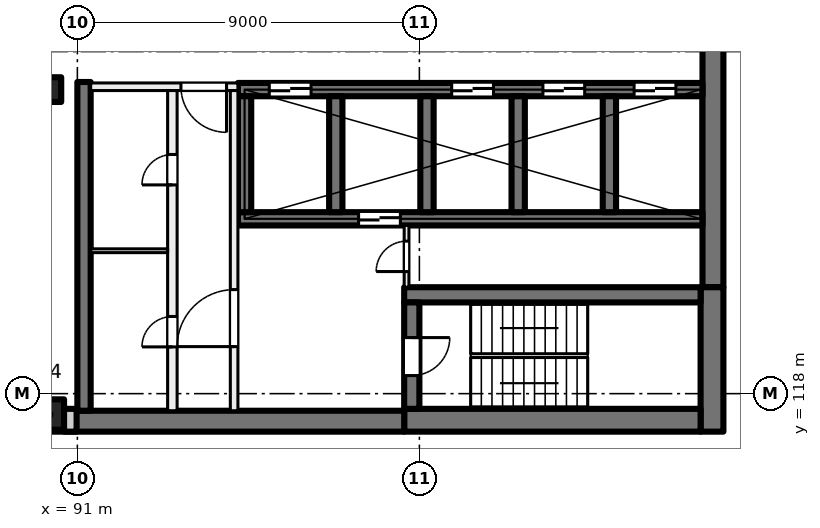
"""IFC4 building model, lengths in metres.
Left out: names, types, materials, properties, quantities, classifications, styles, units other than length and angle.
Written with IfcOpenShell. Run it as: python <this file> out.ifc"""

import sys

from ifc_helpers import new_model, si_unit, direction, frame, frame_2d, origin, origin_2d, place, context, subcontext, project, spatial, rectangle, extrude, element, fill, save


model = new_model("IFC4")
c1 = context("Model", 3, precision=1e-05, world=origin(), true_north=direction((0.0, 1.0)))
c2 = subcontext(c1, "Body", "Model", "MODEL_VIEW")
j1 = project(units=[si_unit("LENGTHUNIT", "METRE"), si_unit("PLANEANGLEUNIT", "RADIAN")], contexts=[c1])
p1 = place(None, origin())
s1 = spatial("IfcSite", under=j1, at=p1, CompositionType="ELEMENT")
p2 = place(p1, origin())
s2 = spatial("IfcBuilding", under=s1, at=p2, CompositionType="ELEMENT")
p3 = place(p2, frame((0.0, 0.0, 142.5)))
s3 = spatial("IfcBuildingStorey", under=s2, at=p3, CompositionType="ELEMENT", Elevation=142.5)
p4 = place(p3, frame((90.25, 126.0, 0.0), z_axis=(0.0, 0.0, 1.0), x_axis=(1.0, 0.0, 0.0)))
e1 = element("IfcColumn", 1, at=p4, inside=s3, PredefinedType="COLUMN", context=c2, shape_type="SweptSolid", body=[
    extrude(rectangle(XDim=0.65, YDim=0.65, at=origin_2d()), origin(), (0.0, 0.0, 1.0), 4.0),
])
p5 = place(p3, frame((90.25, 117.45, 0.0), z_axis=(0.0, 0.0, 1.0), x_axis=(1.0, 0.0, 0.0)))
e2 = element("IfcColumn", 2, at=p5, inside=s3, PredefinedType="COLUMN", context=c2, shape_type="SweptSolid", body=[
    extrude(rectangle(XDim=0.8, YDim=0.8, at=origin_2d()), origin(), (0.0, 0.0, 1.0), 4.0),
])
p6 = place(p3, frame((107.725, 135.2, 0.0), z_axis=(0.0, 0.0, 1.0), x_axis=(0.0, -1.0, 0.0)))
e3 = element("IfcWall", 3, at=p6, inside=s3, PredefinedType="SHEAR", context=c2, shape_type="SweptSolid", body=[
    extrude(rectangle(XDim=14.4, YDim=0.55, at=frame_2d((7.2, 0.0))), origin(), (0.0, 0.0, 1.0), 4.0),
])
p7 = place(p3, frame((107.7, 120.8, 0.0), z_axis=(0.0, 0.0, 1.0), x_axis=(0.0, -1.0, 0.0)))
e4 = element("IfcWall", 4, at=p7, inside=s3, PredefinedType="SHEAR", context=c2, shape_type="SweptSolid", body=[
    extrude(rectangle(XDim=3.8, YDim=0.6, at=frame_2d((1.9, 0.0))), origin(), (0.0, 0.0, 1.0), 4.0),
])
p8 = place(p3, frame((107.4, 117.3, 0.0), z_axis=(0.0, 0.0, 1.0), x_axis=(-1.0, 0.0, 0.0)))
e5 = element("IfcWall", 5, at=p8, inside=s3, PredefinedType="SHEAR", context=c2, shape_type="SweptSolid", body=[
    extrude(rectangle(XDim=7.8, YDim=0.6, at=frame_2d((3.9, 0.0))), origin(), (0.0, 0.0, 1.0), 4.0),
])
p9 = place(p3, frame((99.6, 117.275, 0.0), z_axis=(0.0, 0.0, 1.0), x_axis=(-1.0, 0.0, 0.0)))
e6 = element("IfcWall", 6, at=p9, inside=s3, PredefinedType="SHEAR", context=c2, shape_type="SweptSolid", body=[
    extrude(rectangle(XDim=8.95, YDim=0.55, at=frame_2d((4.475, 0.0))), origin(), (0.0, 0.0, 1.0), 4.0),
])
p10 = place(p3, frame((107.4, 120.6, 0.0), z_axis=(0.0, 0.0, 1.0), x_axis=(-1.0, 0.0, 0.0)))
e7 = element("IfcWall", 7, at=p10, inside=s3, PredefinedType="SHEAR", context=c2, shape_type="SweptSolid", body=[
    extrude(rectangle(XDim=7.8, YDim=0.4, at=frame_2d((3.9, 0.0))), origin(), (0.0, 0.0, 1.0), 4.0),
])
p11 = place(p3, frame((99.8, 120.4, 0.0), z_axis=(0.0, 0.0, 1.0), x_axis=(0.0, -1.0, 0.0)))
e8 = element("IfcWall", 8, at=p11, inside=s3, PredefinedType="SHEAR", context=c2, shape_type="SweptSolid", body=[
    extrude(rectangle(XDim=2.8, YDim=0.4, at=frame_2d((1.4, 0.0))), origin(), (0.0, 0.0, 1.0), 4.0),
])
p12 = place(p11, frame((0.925, 0.0, 0.0)))
e9 = element("IfcOpeningElement", 9, at=p12, cuts=e8, PredefinedType="OPENING", context=c2, shape_type="SweptSolid", body=[
    extrude(rectangle(XDim=1.0, YDim=2.1, at=frame_2d((0.5, 1.05))), frame((0.0, 0.21, 0.0), z_axis=(0.0, -1.0, 0.0), x_axis=(1.0, 0.0, 0.0)), (0.0, 0.0, 1.0), 0.42),
])
p13 = place(p3, frame((107.45, 126.0, 0.0), z_axis=(0.0, 0.0, 1.0), x_axis=(-1.0, 0.0, 0.0)))
e10 = element("IfcWall", 10, at=p13, inside=s3, PredefinedType="SHEAR", context=c2, shape_type="SweptSolid", body=[
    extrude(rectangle(XDim=12.225, YDim=0.35, at=frame_2d((6.112, 0.0))), origin(), (0.0, 0.0, 1.0), 4.0),
])
p14 = place(p13, frame((0.7, 0.0, 0.0)))
e11 = element("IfcOpeningElement", 11, at=p14, cuts=e10, PredefinedType="OPENING", context=c2, shape_type="SweptSolid", body=[
    extrude(rectangle(XDim=1.1, YDim=2.1, at=frame_2d((0.55, 1.05))), frame((0.0, 0.185, 0.0), z_axis=(0.0, -1.0, 0.0), x_axis=(1.0, 0.0, 0.0)), (0.0, 0.0, 1.0), 0.37),
])
p15 = place(p13, frame((3.1, 0.0, 0.0)))
e12 = element("IfcOpeningElement", 12, at=p15, cuts=e10, PredefinedType="OPENING", context=c2, shape_type="SweptSolid", body=[
    extrude(rectangle(XDim=1.1, YDim=2.1, at=frame_2d((0.55, 1.05))), frame((0.0, 0.185, 0.0), z_axis=(0.0, -1.0, 0.0), x_axis=(1.0, 0.0, 0.0)), (0.0, 0.0, 1.0), 0.37),
])
p16 = place(p13, frame((5.5, 0.0, 0.0)))
e13 = element("IfcOpeningElement", 13, at=p16, cuts=e10, PredefinedType="OPENING", context=c2, shape_type="SweptSolid", body=[
    extrude(rectangle(XDim=1.1, YDim=2.1, at=frame_2d((0.55, 1.05))), frame((0.0, 0.185, 0.0), z_axis=(0.0, -1.0, 0.0), x_axis=(1.0, 0.0, 0.0)), (0.0, 0.0, 1.0), 0.37),
])
p17 = place(p13, frame((10.3, 0.0, 0.0)))
e14 = element("IfcOpeningElement", 14, at=p17, cuts=e10, PredefinedType="OPENING", context=c2, shape_type="SweptSolid", body=[
    extrude(rectangle(XDim=1.1, YDim=2.1, at=frame_2d((0.55, 1.05))), frame((0.0, 0.185, 0.0), z_axis=(0.0, -1.0, 0.0), x_axis=(1.0, 0.0, 0.0)), (0.0, 0.0, 1.0), 0.37),
])
p18 = place(p3, frame((107.45, 122.6, 0.0), z_axis=(0.0, 0.0, 1.0), x_axis=(-1.0, 0.0, 0.0)))
e15 = element("IfcWall", 15, at=p18, inside=s3, PredefinedType="SHEAR", context=c2, shape_type="SweptSolid", body=[
    extrude(rectangle(XDim=12.225, YDim=0.35, at=frame_2d((6.112, 0.0))), origin(), (0.0, 0.0, 1.0), 4.0),
])
p19 = place(p18, frame((7.95, 0.0, 0.0)))
e16 = element("IfcOpeningElement", 16, at=p19, cuts=e15, PredefinedType="OPENING", context=c2, shape_type="SweptSolid", body=[
    extrude(rectangle(XDim=1.1, YDim=2.1, at=frame_2d((0.55, 1.05))), frame((0.0, 0.185, 0.0), z_axis=(0.0, -1.0, 0.0), x_axis=(1.0, 0.0, 0.0)), (0.0, 0.0, 1.0), 0.37),
])
for number, where, z_axis, x_axis in (
    (17, (105.0, 125.825, 0.0), (0.0, 0.0, 1.0), (0.0, -1.0, 0.0)),
    (18, (102.6, 125.825, 0.0), (0.0, 0.0, 1.0), (0.0, -1.0, 0.0)),
    (19, (100.2, 125.825, 0.0), (0.0, 0.0, 1.0), (0.0, -1.0, 0.0)),
    (20, (97.8, 125.825, 0.0), (0.0, 0.0, 1.0), (0.0, -1.0, 0.0)),
    (21, (95.4, 125.825, 0.0), (0.0, 0.0, 1.0), (0.0, -1.0, 0.0)),
):
    element("IfcWall", number, at=place(p3, frame(where, z_axis=z_axis, x_axis=x_axis)), inside=s3, PredefinedType="SHEAR", context=c2, shape_type="SweptSolid", body=[
        extrude(rectangle(XDim=3.05, YDim=0.35, at=frame_2d((1.525, 0.0))), origin(), (0.0, 0.0, 1.0), 4.0),
    ])
p20 = place(p3, frame((91.175, 126.2, 0.0), z_axis=(0.0, 0.0, 1.0), x_axis=(0.0, -1.0, 0.0)))
e22 = element("IfcWall", 22, at=p20, inside=s3, PredefinedType="SHEAR", context=c2, shape_type="SweptSolid", body=[
    extrude(rectangle(XDim=8.65, YDim=0.35, at=frame_2d((4.325, 0.0))), origin(), (0.0, 0.0, 1.0), 4.0),
])
p21 = place(p3, frame((90.98, 117.3, 0.0), z_axis=(0.0, 0.0, 1.0), x_axis=(-1.0, 0.0, 0.0)))
e23 = element("IfcWall", 23, at=p21, inside=s3, PredefinedType="SOLIDWALL", context=c2, shape_type="SweptSolid", body=[
    extrude(rectangle(XDim=33.745, YDim=0.6, at=frame_2d((16.873, 0.0))), origin(), (0.0, 0.0, 1.0), 3.625),
])
p22 = place(p21, frame((1.48, 0.0, 0.9)))
e24 = element("IfcOpeningElement", 24, at=p22, cuts=e23, PredefinedType="OPENING", context=c2, shape_type="SweptSolid", body=[
    extrude(rectangle(XDim=3.0, YDim=2.4, at=frame_2d((1.5, 1.2))), frame((0.0, 0.31, 0.0), z_axis=(0.0, -1.0, 0.0), x_axis=(1.0, 0.0, 0.0)), (0.0, 0.0, 1.0), 0.62),
])
p23 = place(p21, frame((5.98, 0.0, 0.9)))
e25 = element("IfcOpeningElement", 25, at=p23, cuts=e23, PredefinedType="OPENING", context=c2, shape_type="SweptSolid", body=[
    extrude(rectangle(XDim=3.0, YDim=2.4, at=frame_2d((1.5, 1.2))), frame((0.0, 0.31, 0.0), z_axis=(0.0, -1.0, 0.0), x_axis=(1.0, 0.0, 0.0)), (0.0, 0.0, 1.0), 0.62),
])
p24 = place(p21, frame((10.48, 0.0, 0.9)))
e26 = element("IfcOpeningElement", 26, at=p24, cuts=e23, PredefinedType="OPENING", context=c2, shape_type="SweptSolid", body=[
    extrude(rectangle(XDim=3.0, YDim=2.4, at=frame_2d((1.5, 1.2))), frame((0.0, 0.31, 0.0), z_axis=(0.0, -1.0, 0.0), x_axis=(1.0, 0.0, 0.0)), (0.0, 0.0, 1.0), 0.62),
])
p25 = place(p21, frame((14.98, 0.0, 0.9)))
e27 = element("IfcOpeningElement", 27, at=p25, cuts=e23, PredefinedType="OPENING", context=c2, shape_type="SweptSolid", body=[
    extrude(rectangle(XDim=3.0, YDim=2.4, at=frame_2d((1.5, 1.2))), frame((0.0, 0.31, 0.0), z_axis=(0.0, -1.0, 0.0), x_axis=(1.0, 0.0, 0.0)), (0.0, 0.0, 1.0), 0.62),
])
p26 = place(p21, frame((19.48, 0.0, 0.9)))
e28 = element("IfcOpeningElement", 28, at=p26, cuts=e23, PredefinedType="OPENING", context=c2, shape_type="SweptSolid", body=[
    extrude(rectangle(XDim=3.0, YDim=2.4, at=frame_2d((1.5, 1.2))), frame((0.0, 0.31, 0.0), z_axis=(0.0, -1.0, 0.0), x_axis=(1.0, 0.0, 0.0)), (0.0, 0.0, 1.0), 0.62),
])
p27 = place(p21, frame((23.98, 0.0, 0.9)))
e29 = element("IfcOpeningElement", 29, at=p27, cuts=e23, PredefinedType="OPENING", context=c2, shape_type="SweptSolid", body=[
    extrude(rectangle(XDim=3.0, YDim=2.4, at=frame_2d((1.5, 1.2))), frame((0.0, 0.31, 0.0), z_axis=(0.0, -1.0, 0.0), x_axis=(1.0, 0.0, 0.0)), (0.0, 0.0, 1.0), 0.62),
])
p28 = place(p21, frame((29.08, 0.0, 0.0)))
e30 = element("IfcOpeningElement", 30, at=p28, cuts=e23, PredefinedType="OPENING", context=c2, shape_type="SweptSolid", body=[
    extrude(rectangle(XDim=1.8, YDim=2.4, at=frame_2d((0.9, 1.2))), frame((0.0, 0.31, 0.0), z_axis=(0.0, -1.0, 0.0), x_axis=(1.0, 0.0, 0.0)), (0.0, 0.0, 1.0), 0.62),
])
p29 = place(p3, frame((95.225, 126.075, 0.0), z_axis=(0.0, 0.0, 1.0), x_axis=(-1.0, 0.0, 0.0)))
e31 = element("IfcWall", 31, at=p29, inside=s3, PredefinedType="PARTITIONING", context=c2, shape_type="SweptSolid", body=[
    extrude(rectangle(XDim=3.875, YDim=0.2, at=frame_2d((1.938, 0.0))), origin(), (0.0, 0.0, 1.0), 3.625),
])
p30 = place(p29, frame((0.3, 0.0, 0.0)))
e32 = element("IfcOpeningElement", 32, at=p30, cuts=e31, PredefinedType="OPENING", context=c2, shape_type="SweptSolid", body=[
    extrude(rectangle(XDim=1.2, YDim=2.1, at=frame_2d((0.6, 1.05))), frame((0.0, 0.11, 0.0), z_axis=(0.0, -1.0, 0.0), x_axis=(1.0, 0.0, 0.0)), (0.0, 0.0, 1.0), 0.22),
])
p31 = place(p3, frame((95.125, 117.55, 0.0), z_axis=(0.0, 0.0, 1.0), x_axis=(0.0, 1.0, 0.0)))
e33 = element("IfcWall", 33, at=p31, inside=s3, PredefinedType="PARTITIONING", context=c2, shape_type="SweptSolid", body=[
    extrude(rectangle(XDim=8.425, YDim=0.2, at=frame_2d((4.212, 0.0))), origin(), (0.0, 0.0, 1.0), 3.625),
])
p32 = place(p31, frame((1.688, 0.0, 0.0)))
e34 = element("IfcOpeningElement", 34, at=p32, cuts=e33, PredefinedType="OPENING", context=c2, shape_type="SweptSolid", body=[
    extrude(rectangle(XDim=1.5, YDim=2.1, at=frame_2d((0.75, 1.05))), frame((0.0, 0.11, 0.0), z_axis=(0.0, -1.0, 0.0), x_axis=(1.0, 0.0, 0.0)), (0.0, 0.0, 1.0), 0.22),
])
p33 = place(p3, frame((93.5, 117.55, 0.0), z_axis=(0.0, 0.0, 1.0), x_axis=(0.0, 1.0, 0.0)))
e35 = element("IfcWall", 35, at=p33, inside=s3, PredefinedType="PARTITIONING", context=c2, shape_type="SweptSolid", body=[
    extrude(rectangle(XDim=8.425, YDim=0.25, at=frame_2d((4.212, 0.0))), origin(), (0.0, 0.0, 1.0), 3.625),
])
p34 = place(p33, frame((5.942, 0.0, 0.0)))
e36 = element("IfcOpeningElement", 36, at=p34, cuts=e35, PredefinedType="OPENING", context=c2, shape_type="SweptSolid", body=[
    extrude(rectangle(XDim=0.8, YDim=2.1, at=frame_2d((0.4, 1.05))), frame((0.0, 0.135, 0.0), z_axis=(0.0, -1.0, 0.0), x_axis=(1.0, 0.0, 0.0)), (0.0, 0.0, 1.0), 0.27),
])
p35 = place(p33, frame((1.68, 0.0, 0.0)))
e37 = element("IfcOpeningElement", 37, at=p35, cuts=e35, PredefinedType="OPENING", context=c2, shape_type="SweptSolid", body=[
    extrude(rectangle(XDim=0.8, YDim=2.1, at=frame_2d((0.4, 1.05))), frame((0.0, 0.135, 0.0), z_axis=(0.0, -1.0, 0.0), x_axis=(1.0, 0.0, 0.0)), (0.0, 0.0, 1.0), 0.27),
])
p36 = place(p3, frame((99.663, 120.8, 0.0), z_axis=(0.0, 0.0, 1.0), x_axis=(0.0, 1.0, 0.0)))
e38 = element("IfcWall", 38, at=p36, inside=s3, PredefinedType="PARTITIONING", context=c2, shape_type="SweptSolid", body=[
    extrude(rectangle(XDim=1.625, YDim=0.125, at=frame_2d((0.812, 0.0))), origin(), (0.0, 0.0, 1.0), 3.625),
])
p37 = place(p36, frame((0.413, 0.0, 0.0)))
e39 = element("IfcOpeningElement", 39, at=p37, cuts=e38, PredefinedType="OPENING", context=c2, shape_type="SweptSolid", body=[
    extrude(rectangle(XDim=0.8, YDim=2.1, at=frame_2d((0.4, 1.05))), frame((0.0, 0.073, 0.0), z_axis=(0.0, -1.0, 0.0), x_axis=(1.0, 0.0, 0.0)), (0.0, 0.0, 1.0), 0.145),
])
p38 = place(p3, frame((93.375, 121.76, 0.0), z_axis=(0.0, 0.0, 1.0), x_axis=(-1.0, 0.0, 0.0)))
e40 = element("IfcWall", 40, at=p38, inside=s3, PredefinedType="PARTITIONING", context=c2, shape_type="SweptSolid", body=[
    extrude(rectangle(XDim=2.025, YDim=0.1, at=frame_2d((1.012, 0.0))), origin(), (0.0, 0.0, 1.0), 3.625),
])
p39 = place(p14, origin())
e41 = element("IfcDoor", 41, at=p39, inside=s3, OperationType="DOUBLE_DOOR_SLIDING", PredefinedType="DOOR", context=c2, shape_type="SweptSolid", body=[
    extrude(rectangle(XDim=1.1, YDim=2.1, at=frame_2d((0.55, 1.05))), frame((0.0, 0.025, 0.0), z_axis=(0.0, -1.0, 0.0), x_axis=(1.0, 0.0, 0.0)), (0.0, 0.0, 1.0), 0.05),
])
fill(e11, e41)
p40 = place(p15, origin())
e42 = element("IfcDoor", 42, at=p40, inside=s3, OperationType="DOUBLE_DOOR_SLIDING", PredefinedType="DOOR", context=c2, shape_type="SweptSolid", body=[
    extrude(rectangle(XDim=1.1, YDim=2.1, at=frame_2d((0.55, 1.05))), frame((0.0, 0.025, 0.0), z_axis=(0.0, -1.0, 0.0), x_axis=(1.0, 0.0, 0.0)), (0.0, 0.0, 1.0), 0.05),
])
fill(e12, e42)
p41 = place(p16, origin())
e43 = element("IfcDoor", 43, at=p41, inside=s3, OperationType="DOUBLE_DOOR_SLIDING", PredefinedType="DOOR", context=c2, shape_type="SweptSolid", body=[
    extrude(rectangle(XDim=1.1, YDim=2.1, at=frame_2d((0.55, 1.05))), frame((0.0, 0.025, 0.0), z_axis=(0.0, -1.0, 0.0), x_axis=(1.0, 0.0, 0.0)), (0.0, 0.0, 1.0), 0.05),
])
fill(e13, e43)
p42 = place(p17, origin())
e44 = element("IfcDoor", 44, at=p42, inside=s3, OperationType="DOUBLE_DOOR_SLIDING", PredefinedType="DOOR", context=c2, shape_type="SweptSolid", body=[
    extrude(rectangle(XDim=1.1, YDim=2.1, at=frame_2d((0.55, 1.05))), frame((0.0, 0.025, 0.0), z_axis=(0.0, -1.0, 0.0), x_axis=(1.0, 0.0, 0.0)), (0.0, 0.0, 1.0), 0.05),
])
fill(e14, e44)
p43 = place(p30, origin())
e45 = element("IfcDoor", 45, at=p43, inside=s3, OperationType="DOUBLE_DOOR_SINGLE_SWING", PredefinedType="DOOR", context=c2, shape_type="SweptSolid", body=[
    extrude(rectangle(XDim=1.2, YDim=2.1, at=frame_2d((0.6, 1.05))), frame((0.0, 0.025, 0.0), z_axis=(0.0, -1.0, 0.0), x_axis=(1.0, 0.0, 0.0)), (0.0, 0.0, 1.0), 0.05),
])
fill(e32, e45)
p44 = place(p32, origin())
e46 = element("IfcDoor", 46, at=p44, inside=s3, OperationType="DOUBLE_DOOR_SINGLE_SWING", PredefinedType="DOOR", context=c2, shape_type="SweptSolid", body=[
    extrude(rectangle(XDim=1.5, YDim=2.1, at=frame_2d((0.75, 1.05))), frame((0.0, 0.025, 0.0), z_axis=(0.0, -1.0, 0.0), x_axis=(1.0, 0.0, 0.0)), (0.0, 0.0, 1.0), 0.05),
])
fill(e34, e46)
p45 = place(p12, origin())
e47 = element("IfcDoor", 47, at=p45, inside=s3, OperationType="SINGLE_SWING_LEFT", PredefinedType="DOOR", context=c2, shape_type="SweptSolid", body=[
    extrude(rectangle(XDim=1.0, YDim=2.1, at=frame_2d((0.5, 1.05))), frame((0.0, 0.025, 0.0), z_axis=(0.0, -1.0, 0.0), x_axis=(1.0, 0.0, 0.0)), (0.0, 0.0, 1.0), 0.05),
])
fill(e9, e47)
p46 = place(p37, origin())
e48 = element("IfcDoor", 48, at=p46, inside=s3, OperationType="SINGLE_SWING_RIGHT", PredefinedType="DOOR", context=c2, shape_type="SweptSolid", body=[
    extrude(rectangle(XDim=0.8, YDim=2.1, at=frame_2d((0.4, 1.05))), frame((0.0, 0.025, 0.0), z_axis=(0.0, -1.0, 0.0), x_axis=(1.0, 0.0, 0.0)), (0.0, 0.0, 1.0), 0.05),
])
fill(e39, e48)
p47 = place(p34, origin())
e49 = element("IfcDoor", 49, at=p47, inside=s3, OperationType="SINGLE_SWING_LEFT", PredefinedType="DOOR", context=c2, shape_type="SweptSolid", body=[
    extrude(rectangle(XDim=0.8, YDim=2.1, at=frame_2d((0.4, 1.05))), frame((0.0, 0.025, 0.0), z_axis=(0.0, -1.0, 0.0), x_axis=(1.0, 0.0, 0.0)), (0.0, 0.0, 1.0), 0.05),
])
fill(e36, e49)
p48 = place(p35, origin())
e50 = element("IfcDoor", 50, at=p48, inside=s3, OperationType="SINGLE_SWING_RIGHT", PredefinedType="DOOR", context=c2, shape_type="SweptSolid", body=[
    extrude(rectangle(XDim=0.8, YDim=2.1, at=frame_2d((0.4, 1.05))), frame((0.0, 0.025, 0.0), z_axis=(0.0, -1.0, 0.0), x_axis=(1.0, 0.0, 0.0)), (0.0, 0.0, 1.0), 0.05),
])
fill(e37, e50)
p49 = place(p19, origin())
e51 = element("IfcDoor", 51, at=p49, inside=s3, OperationType="DOUBLE_DOOR_SLIDING", PredefinedType="DOOR", context=c2, shape_type="SweptSolid", body=[
    extrude(rectangle(XDim=1.1, YDim=2.1, at=frame_2d((0.55, 1.05))), frame((0.0, 0.025, 0.0), z_axis=(0.0, -1.0, 0.0), x_axis=(1.0, 0.0, 0.0)), (0.0, 0.0, 1.0), 0.05),
])
fill(e16, e51)
save(model, sys.argv[1])
